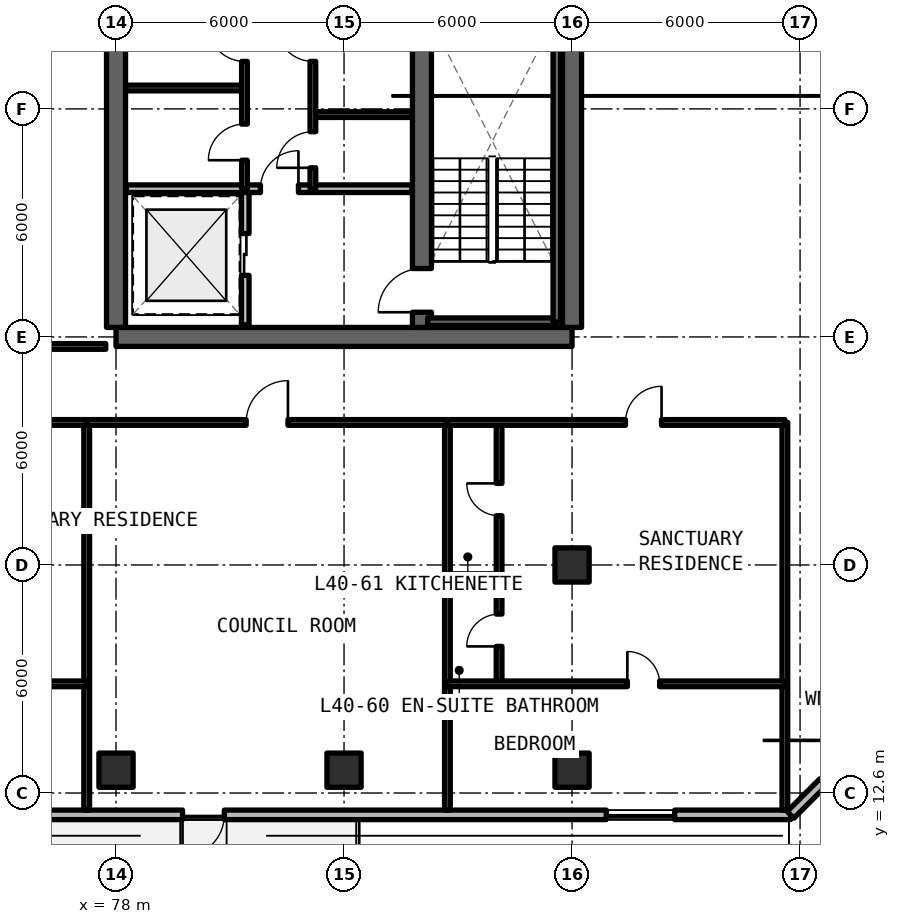
"""IFC4 building model, lengths in metres.
Left out: names, types, materials, properties, quantities, classifications, styles, units other than length and angle.
Written with IfcOpenShell. Run it as: python <this file> out.ifc"""

import sys

from ifc_helpers import new_model, si_unit, direction, frame, frame_2d, origin, origin_2d, place, context, subcontext, project, spatial, rectangle, extrude, element, fill, save


model = new_model("IFC4")
c1 = context("Model", 3, precision=1e-05, world=origin(), true_north=direction((0.0, 1.0)))
c2 = subcontext(c1, "Body", "Model", "MODEL_VIEW")
j1 = project(units=[si_unit("LENGTHUNIT", "METRE"), si_unit("PLANEANGLEUNIT", "RADIAN")], contexts=[c1])
p1 = place(None, origin())
s1 = spatial("IfcSite", under=j1, at=p1, CompositionType="ELEMENT")
p2 = place(p1, origin())
s2 = spatial("IfcBuilding", under=s1, at=p2, CompositionType="ELEMENT")
p3 = place(p2, frame((0.0, 0.0, 145.2)))
s3 = spatial("IfcBuildingStorey", under=s2, at=p3, CompositionType="ELEMENT", Elevation=145.2)
p4 = place(p3, frame((78.0, 24.6, 0.0), z_axis=(0.0, 0.0, 1.0), x_axis=(1.0, 0.0, 0.0)))
e1 = element("IfcWall", 1, at=p4, inside=s3, PredefinedType="SHEAR", context=c2, shape_type="SweptSolid", body=[
    extrude(rectangle(XDim=12.0, YDim=0.5, at=frame_2d((6.0, 0.0))), origin(), (0.0, 0.0, 1.0), 3.3),
])
p5 = place(p3, frame((90.0, 24.85, 0.0), z_axis=(0.0, 0.0, 1.0), x_axis=(0.0, 1.0, 0.0)))
e2 = element("IfcWall", 2, at=p5, inside=s3, PredefinedType="SHEAR", context=c2, shape_type="SweptSolid", body=[
    extrude(rectangle(XDim=17.5, YDim=0.5, at=frame_2d((8.75, 0.0))), origin(), (0.0, 0.0, 1.0), 3.3),
])
p6 = place(p3, frame((78.0, 24.85, 0.0), z_axis=(0.0, 0.0, 1.0), x_axis=(0.0, 1.0, 0.0)))
e3 = element("IfcWall", 3, at=p6, inside=s3, PredefinedType="SHEAR", context=c2, shape_type="SweptSolid", body=[
    extrude(rectangle(XDim=8.95, YDim=0.5, at=frame_2d((4.475, 0.0))), origin(), (0.0, 0.0, 1.0), 3.3),
])
p7 = place(p3, frame((86.05, 24.85, 0.0), z_axis=(0.0, 0.0, 1.0), x_axis=(0.0, 1.0, 0.0)))
e4 = element("IfcWall", 4, at=p7, inside=s3, PredefinedType="SHEAR", context=c2, shape_type="SweptSolid", body=[
    extrude(rectangle(XDim=17.5, YDim=0.5, at=frame_2d((8.75, 0.0))), origin(), (0.0, 0.0, 1.0), 3.3),
])
p8 = place(p7, frame((0.4, 0.0, 0.0)))
e5 = element("IfcOpeningElement", 5, at=p8, cuts=e4, PredefinedType="OPENING", context=c2, shape_type="SweptSolid", body=[
    extrude(rectangle(XDim=1.15, YDim=2.15, at=frame_2d((0.575, 1.075))), frame((0.0, 0.26, 0.0), z_axis=(0.0, -1.0, 0.0), x_axis=(1.0, 0.0, 0.0)), (0.0, 0.0, 1.0), 0.52),
])
p9 = place(p7, frame((9.6, 0.0, 0.0)))
e6 = element("IfcOpeningElement", 6, at=p9, cuts=e4, PredefinedType="OPENING", context=c2, shape_type="SweptSolid", body=[
    extrude(rectangle(XDim=1.15, YDim=2.15, at=frame_2d((0.575, 1.075))), frame((0.0, 0.26, 0.0), z_axis=(0.0, -1.0, 0.0), x_axis=(1.0, 0.0, 0.0)), (0.0, 0.0, 1.0), 0.52),
])
for number, where, z_axis, x_axis in (
    (7, (90.0, 18.6, 0.0), (0.0, 0.0, 1.0), (1.0, 0.0, 0.0)),
    (8, (78.0, 13.2, 0.0), (0.0, 0.0, 1.0), (1.0, 0.0, 0.0)),
    (9, (84.0, 13.2, 0.0), (0.0, 0.0, 1.0), (1.0, 0.0, 0.0)),
    (10, (90.0, 13.2, 0.0), (0.0, 0.0, 1.0), (1.0, 0.0, 0.0)),
):
    element("IfcColumn", number, at=place(p3, frame(where, z_axis=z_axis, x_axis=x_axis)), inside=s3, PredefinedType="COLUMN", context=c2, shape_type="SweptSolid", body=[
        extrude(rectangle(XDim=0.9, YDim=0.9, at=origin_2d()), origin(), (0.0, 0.0, 1.0), 3.3),
    ])
p10 = place(p3, frame((52.125, 12.025, 0.0), z_axis=(0.0, 0.0, 1.0), x_axis=(1.0, 0.0, 0.0)))
e11 = element("IfcWall", 11, at=p10, inside=s3, PredefinedType="SOLIDWALL", context=c2, shape_type="SweptSolid", body=[
    extrude(rectangle(XDim=43.623, YDim=0.25, at=frame_2d((21.812, 0.0))), origin(), (0.0, 0.0, 1.0), 3.08),
])
p11 = place(p10, frame((16.775, 0.0, 0.0)))
e12 = element("IfcOpeningElement", 12, at=p11, cuts=e11, PredefinedType="OPENING", context=c2, shape_type="SweptSolid", body=[
    extrude(rectangle(XDim=1.1, YDim=2.15, at=frame_2d((0.55, 1.075))), frame((0.0, 0.135, 0.0), z_axis=(0.0, -1.0, 0.0), x_axis=(1.0, 0.0, 0.0)), (0.0, 0.0, 1.0), 0.27),
])
p12 = place(p10, frame((27.625, 0.0, 0.0)))
e13 = element("IfcOpeningElement", 13, at=p12, cuts=e11, PredefinedType="OPENING", context=c2, shape_type="SweptSolid", body=[
    extrude(rectangle(XDim=1.1, YDim=2.15, at=frame_2d((0.55, 1.075))), frame((0.0, 0.135, 0.0), z_axis=(0.0, -1.0, 0.0), x_axis=(1.0, 0.0, 0.0)), (0.0, 0.0, 1.0), 0.27),
])
p13 = place(p10, frame((2.769, 0.0, 0.78)))
e14 = element("IfcOpeningElement", 14, at=p13, cuts=e11, PredefinedType="OPENING", context=c2, shape_type="SweptSolid", body=[
    extrude(rectangle(XDim=1.8, YDim=1.66, at=frame_2d((0.9, 0.83))), frame((0.0, 0.135, 0.0), z_axis=(0.0, -1.0, 0.0), x_axis=(1.0, 0.0, 0.0)), (0.0, 0.0, 1.0), 0.27),
])
p14 = place(p10, frame((10.884, 0.0, 0.78)))
e15 = element("IfcOpeningElement", 15, at=p14, cuts=e11, PredefinedType="OPENING", context=c2, shape_type="SweptSolid", body=[
    extrude(rectangle(XDim=1.8, YDim=1.66, at=frame_2d((0.9, 0.83))), frame((0.0, 0.135, 0.0), z_axis=(0.0, -1.0, 0.0), x_axis=(1.0, 0.0, 0.0)), (0.0, 0.0, 1.0), 0.27),
])
p15 = place(p10, frame((38.775, 0.0, 0.78)))
e16 = element("IfcOpeningElement", 16, at=p15, cuts=e11, PredefinedType="OPENING", context=c2, shape_type="SweptSolid", body=[
    extrude(rectangle(XDim=1.8, YDim=1.66, at=frame_2d((0.9, 0.83))), frame((0.0, 0.135, 0.0), z_axis=(0.0, -1.0, 0.0), x_axis=(1.0, 0.0, 0.0)), (0.0, 0.0, 1.0), 0.27),
])
p16 = place(p3, frame((95.748, 12.025, 0.0), z_axis=(0.0, 0.0, 1.0), x_axis=(0.70708586489, 0.707127696864, 0.0)))
e17 = element("IfcWall", 17, at=p16, inside=s3, PredefinedType="SOLIDWALL", context=c2, shape_type="SweptSolid", body=[
    extrude(rectangle(XDim=5.836, YDim=0.25, at=frame_2d((2.918, 0.0))), origin(), (0.0, 0.0, 1.0), 3.08),
])
p17 = place(p16, frame((1.218, 0.0, 0.78)))
e18 = element("IfcOpeningElement", 18, at=p17, cuts=e17, PredefinedType="OPENING", context=c2, shape_type="SweptSolid", body=[
    extrude(rectangle(XDim=3.4, YDim=1.66, at=frame_2d((1.7, 0.83))), frame((0.0, 0.135, 0.0), z_axis=(0.0, -1.0, 0.0), x_axis=(1.0, 0.0, 0.0)), (0.0, 0.0, 1.0), 0.27),
])
p18 = place(p3, frame((81.4, 24.92, 0.0), z_axis=(0.0, 0.0, 1.0), x_axis=(0.0, 1.0, 0.0)))
e19 = element("IfcWall", 19, at=p18, inside=s3, PredefinedType="SOLIDWALL", context=c2, shape_type="SweptSolid", body=[
    extrude(rectangle(XDim=3.58, YDim=0.2, at=frame_2d((1.79, 0.0))), origin(), (0.0, 0.0, 1.0), 2.35),
])
p19 = place(p18, frame((1.3, 0.0, 0.0)))
e20 = element("IfcOpeningElement", 20, at=p19, cuts=e19, PredefinedType="OPENING", context=c2, shape_type="SweptSolid", body=[
    extrude(rectangle(XDim=1.1, YDim=2.2, at=frame_2d((0.55, 1.1))), frame((0.0, 0.11, 0.0), z_axis=(0.0, -1.0, 0.0), x_axis=(1.0, 0.0, 0.0)), (0.0, 0.0, 1.0), 0.22),
])
p20 = place(p3, frame((78.27, 28.5, 0.0), z_axis=(0.0, 0.0, 1.0), x_axis=(1.0, 0.0, 0.0)))
e21 = element("IfcWall", 21, at=p20, inside=s3, PredefinedType="SOLIDWALL", context=c2, shape_type="SweptSolid", body=[
    extrude(rectangle(XDim=7.51, YDim=0.2, at=frame_2d((3.755, 0.0))), origin(), (0.0, 0.0, 1.0), 2.35),
])
p21 = place(p20, frame((3.53, 0.0, 0.0)))
e22 = element("IfcOpeningElement", 22, at=p21, cuts=e21, PredefinedType="OPENING", context=c2, shape_type="SweptSolid", body=[
    extrude(rectangle(XDim=1.0, YDim=2.15, at=frame_2d((0.5, 1.075))), frame((0.0, 0.11, 0.0), z_axis=(0.0, -1.0, 0.0), x_axis=(1.0, 0.0, 0.0)), (0.0, 0.0, 1.0), 0.22),
])
p22 = place(p3, frame((83.2, 30.45, 0.0), z_axis=(0.0, 0.0, 1.0), x_axis=(1.0, 0.0, 0.0)))
e23 = element("IfcWall", 23, at=p22, inside=s3, PredefinedType="SOLIDWALL", context=c2, shape_type="SweptSolid", body=[
    extrude(rectangle(XDim=2.58, YDim=0.15, at=frame_2d((1.29, 0.0))), origin(), (0.0, 0.0, 1.0), 2.35),
])
p23 = place(p3, frame((83.18, 28.5, 0.0), z_axis=(0.0, 0.0, 1.0), x_axis=(0.0, 1.0, 0.0)))
e24 = element("IfcWall", 24, at=p23, inside=s3, PredefinedType="SOLIDWALL", context=c2, shape_type="SweptSolid", body=[
    extrude(rectangle(XDim=5.22, YDim=0.15, at=frame_2d((2.61, 0.0))), origin(), (0.0, 0.0, 1.0), 2.35),
])
p24 = place(p23, frame((0.55, 0.0, 0.0)))
e25 = element("IfcOpeningElement", 25, at=p24, cuts=e24, PredefinedType="OPENING", context=c2, shape_type="SweptSolid", body=[
    extrude(rectangle(XDim=0.95, YDim=2.15, at=frame_2d((0.475, 1.075))), frame((0.0, 0.085, 0.0), z_axis=(0.0, -1.0, 0.0), x_axis=(1.0, 0.0, 0.0)), (0.0, 0.0, 1.0), 0.17),
])
p25 = place(p23, frame((3.35, 0.0, 0.0)))
e26 = element("IfcOpeningElement", 26, at=p25, cuts=e24, PredefinedType="OPENING", context=c2, shape_type="SweptSolid", body=[
    extrude(rectangle(XDim=0.95, YDim=2.15, at=frame_2d((0.475, 1.075))), frame((0.0, 0.085, 0.0), z_axis=(0.0, -1.0, 0.0), x_axis=(1.0, 0.0, 0.0)), (0.0, 0.0, 1.0), 0.17),
])
p26 = place(p3, frame((78.27, 31.15, 0.0), z_axis=(0.0, 0.0, 1.0), x_axis=(1.0, 0.0, 0.0)))
e27 = element("IfcWall", 27, at=p26, inside=s3, PredefinedType="SOLIDWALL", context=c2, shape_type="SweptSolid", body=[
    extrude(rectangle(XDim=3.05, YDim=0.15, at=frame_2d((1.525, 0.0))), origin(), (0.0, 0.0, 1.0), 2.35),
])
p27 = place(p3, frame((81.38, 28.5, 0.0), z_axis=(0.0, 0.0, 1.0), x_axis=(0.0, 1.0, 0.0)))
e28 = element("IfcWall", 28, at=p27, inside=s3, PredefinedType="SOLIDWALL", context=c2, shape_type="SweptSolid", body=[
    extrude(rectangle(XDim=5.22, YDim=0.15, at=frame_2d((2.61, 0.0))), origin(), (0.0, 0.0, 1.0), 2.35),
])
p28 = place(p27, frame((0.75, 0.0, 0.0)))
e29 = element("IfcOpeningElement", 29, at=p28, cuts=e28, PredefinedType="OPENING", context=c2, shape_type="SweptSolid", body=[
    extrude(rectangle(XDim=0.95, YDim=2.15, at=frame_2d((0.475, 1.075))), frame((0.0, 0.085, 0.0), z_axis=(0.0, -1.0, 0.0), x_axis=(1.0, 0.0, 0.0)), (0.0, 0.0, 1.0), 0.17),
])
p29 = place(p27, frame((3.35, 0.0, 0.0)))
e30 = element("IfcOpeningElement", 30, at=p29, cuts=e28, PredefinedType="OPENING", context=c2, shape_type="SweptSolid", body=[
    extrude(rectangle(XDim=0.95, YDim=2.15, at=frame_2d((0.475, 1.075))), frame((0.0, 0.085, 0.0), z_axis=(0.0, -1.0, 0.0), x_axis=(1.0, 0.0, 0.0)), (0.0, 0.0, 1.0), 0.17),
])
p30 = place(p3, frame((69.85, 24.35, 0.0), z_axis=(0.0, 0.0, 1.0), x_axis=(1.0, 0.0, 0.0)))
e31 = element("IfcWall", 31, at=p30, inside=s3, PredefinedType="SOLIDWALL", context=c2, shape_type="SweptSolid", body=[
    extrude(rectangle(XDim=7.88, YDim=0.15, at=frame_2d((3.94, 0.0))), origin(), (0.0, 0.0, 1.0), 2.35),
])
for number, where, z_axis, x_axis in (
    (32, (95.6, 12.15, 0.0), (0.0, 0.0, 1.0), (0.0, 1.0, 0.0)),
    (33, (77.228, 12.15, 0.0), (0.0, 0.0, 1.0), (0.0, 1.0, 0.0)),
):
    element("IfcWall", number, at=place(p3, frame(where, z_axis=z_axis, x_axis=x_axis)), inside=s3, PredefinedType="SOLIDWALL", context=c2, shape_type="SweptSolid", body=[
        extrude(rectangle(XDim=10.2, YDim=0.15, at=frame_2d((5.1, 0.0))), origin(), (0.0, 0.0, 1.0), 2.35),
    ])
p31 = place(p3, frame((68.348, 15.472, 0.0), z_axis=(0.0, 0.0, 1.0), x_axis=(1.0, 0.0, 0.0)))
e34 = element("IfcWall", 34, at=p31, inside=s3, PredefinedType="PARTITIONING", context=c2, shape_type="SweptSolid", body=[
    extrude(rectangle(XDim=8.88, YDim=0.15, at=frame_2d((4.44, 0.0))), origin(), (0.0, 0.0, 1.0), 2.35),
])
p32 = place(p31, frame((4.921, 0.0, 0.0)))
e35 = element("IfcOpeningElement", 35, at=p32, cuts=e34, PredefinedType="OPENING", context=c2, shape_type="SweptSolid", body=[
    extrude(rectangle(XDim=0.85, YDim=2.1, at=frame_2d((0.425, 1.05))), frame((0.0, 0.085, 0.0), z_axis=(0.0, -1.0, 0.0), x_axis=(1.0, 0.0, 0.0)), (0.0, 0.0, 1.0), 0.17),
])
p33 = place(p3, frame((68.348, 22.35, 0.0), z_axis=(0.0, 0.0, 1.0), x_axis=(1.0, 0.0, 0.0)))
e36 = element("IfcWall", 36, at=p33, inside=s3, PredefinedType="SOLIDWALL", context=c2, shape_type="SweptSolid", body=[
    extrude(rectangle(XDim=8.88, YDim=0.15, at=frame_2d((4.44, 0.0))), origin(), (0.0, 0.0, 1.0), 2.35),
])
p34 = place(p33, frame((4.871, 0.0, 0.0)))
e37 = element("IfcOpeningElement", 37, at=p34, cuts=e36, PredefinedType="OPENING", context=c2, shape_type="SweptSolid", body=[
    extrude(rectangle(XDim=0.95, YDim=2.15, at=frame_2d((0.475, 1.075))), frame((0.0, 0.085, 0.0), z_axis=(0.0, -1.0, 0.0), x_axis=(1.0, 0.0, 0.0)), (0.0, 0.0, 1.0), 0.17),
])
p35 = place(p3, frame((86.72, 12.15, 0.0), z_axis=(0.0, 0.0, 1.0), x_axis=(0.0, 1.0, 0.0)))
e38 = element("IfcWall", 38, at=p35, inside=s3, PredefinedType="SOLIDWALL", context=c2, shape_type="SweptSolid", body=[
    extrude(rectangle(XDim=10.2, YDim=0.15, at=frame_2d((5.1, 0.0))), origin(), (0.0, 0.0, 1.0), 2.35),
])
p36 = place(p3, frame((77.228, 22.35, 0.0), z_axis=(0.0, 0.0, 1.0), x_axis=(1.0, 0.0, 0.0)))
e39 = element("IfcWall", 39, at=p36, inside=s3, PredefinedType="SOLIDWALL", context=c2, shape_type="SweptSolid", body=[
    extrude(rectangle(XDim=9.492, YDim=0.15, at=frame_2d((4.746, 0.0))), origin(), (0.0, 0.0, 1.0), 2.35),
])
p37 = place(p36, frame((4.196, 0.0, 0.0)))
e40 = element("IfcOpeningElement", 40, at=p37, cuts=e39, PredefinedType="OPENING", context=c2, shape_type="SweptSolid", body=[
    extrude(rectangle(XDim=1.1, YDim=2.15, at=frame_2d((0.55, 1.075))), frame((0.0, 0.085, 0.0), z_axis=(0.0, -1.0, 0.0), x_axis=(1.0, 0.0, 0.0)), (0.0, 0.0, 1.0), 0.17),
])
p38 = place(p3, frame((86.72, 18.292, 0.0), z_axis=(0.0, 0.0, 1.0), x_axis=(1.0, 0.0, 0.0)))
e41 = element("IfcWall", 41, at=p38, inside=s3, PredefinedType="PARTITIONING", context=c2, shape_type="SweptSolid", body=[
    extrude(rectangle(XDim=1.36, YDim=0.15, at=frame_2d((0.68, 0.0))), origin(), (0.0, 0.0, 1.0), 2.35),
])
p39 = place(p3, frame((88.08, 15.472, 0.0), z_axis=(0.0, 0.0, 1.0), x_axis=(0.0, 1.0, 0.0)))
e42 = element("IfcWall", 42, at=p39, inside=s3, PredefinedType="PARTITIONING", context=c2, shape_type="SweptSolid", body=[
    extrude(rectangle(XDim=6.878, YDim=0.15, at=frame_2d((3.439, 0.0))), origin(), (0.0, 0.0, 1.0), 2.35),
])
p40 = place(p39, frame((0.985, 0.0, 0.0)))
e43 = element("IfcOpeningElement", 43, at=p40, cuts=e42, PredefinedType="OPENING", context=c2, shape_type="SweptSolid", body=[
    extrude(rectangle(XDim=0.85, YDim=2.1, at=frame_2d((0.425, 1.05))), frame((0.0, 0.085, 0.0), z_axis=(0.0, -1.0, 0.0), x_axis=(1.0, 0.0, 0.0)), (0.0, 0.0, 1.0), 0.17),
])
p41 = place(p39, frame((4.424, 0.0, 0.0)))
e44 = element("IfcOpeningElement", 44, at=p41, cuts=e42, PredefinedType="OPENING", context=c2, shape_type="SweptSolid", body=[
    extrude(rectangle(XDim=0.85, YDim=2.1, at=frame_2d((0.425, 1.05))), frame((0.0, 0.085, 0.0), z_axis=(0.0, -1.0, 0.0), x_axis=(1.0, 0.0, 0.0)), (0.0, 0.0, 1.0), 0.17),
])
p42 = place(p3, frame((86.72, 15.472, 0.0), z_axis=(0.0, 0.0, 1.0), x_axis=(1.0, 0.0, 0.0)))
e45 = element("IfcWall", 45, at=p42, inside=s3, PredefinedType="PARTITIONING", context=c2, shape_type="SweptSolid", body=[
    extrude(rectangle(XDim=8.88, YDim=0.15, at=frame_2d((4.44, 0.0))), origin(), (0.0, 0.0, 1.0), 2.35),
])
p43 = place(p42, frame((4.735, 0.0, 0.0)))
e46 = element("IfcOpeningElement", 46, at=p43, cuts=e45, PredefinedType="OPENING", context=c2, shape_type="SweptSolid", body=[
    extrude(rectangle(XDim=0.85, YDim=2.1, at=frame_2d((0.425, 1.05))), frame((0.0, 0.085, 0.0), z_axis=(0.0, -1.0, 0.0), x_axis=(1.0, 0.0, 0.0)), (0.0, 0.0, 1.0), 0.17),
])
p44 = place(p3, frame((86.72, 22.35, 0.0), z_axis=(0.0, 0.0, 1.0), x_axis=(1.0, 0.0, 0.0)))
e47 = element("IfcWall", 47, at=p44, inside=s3, PredefinedType="SOLIDWALL", context=c2, shape_type="SweptSolid", body=[
    extrude(rectangle(XDim=8.88, YDim=0.15, at=frame_2d((4.44, 0.0))), origin(), (0.0, 0.0, 1.0), 2.35),
])
p45 = place(p44, frame((4.685, 0.0, 0.0)))
e48 = element("IfcOpeningElement", 48, at=p45, cuts=e47, PredefinedType="OPENING", context=c2, shape_type="SweptSolid", body=[
    extrude(rectangle(XDim=0.95, YDim=2.15, at=frame_2d((0.475, 1.075))), frame((0.0, 0.085, 0.0), z_axis=(0.0, -1.0, 0.0), x_axis=(1.0, 0.0, 0.0)), (0.0, 0.0, 1.0), 0.17),
])
p46 = place(p3, frame((86.2, 25.0, 0.0), z_axis=(0.0, 0.0, 1.0), x_axis=(1.0, 0.0, 0.0)))
e49 = element("IfcWall", 49, at=p46, inside=s3, PredefinedType="SOLIDWALL", context=c2, shape_type="SweptSolid", body=[
    extrude(rectangle(XDim=3.4, YDim=0.2, at=frame_2d((1.7, 0.0))), origin(), (0.0, 0.0, 1.0), 3.3),
])
p47 = place(p3, frame((89.6, 25.0, 0.0), z_axis=(0.0, 0.0, 1.0), x_axis=(0.0, 1.0, 0.0)))
e50 = element("IfcWall", 50, at=p47, inside=s3, PredefinedType="SOLIDWALL", context=c2, shape_type="SweptSolid", body=[
    extrude(rectangle(XDim=8.0, YDim=0.2, at=frame_2d((4.0, 0.0))), origin(), (0.0, 0.0, 1.0), 3.3),
])
p48 = place(p12, frame((1.1, 0.0, 0.0), z_axis=(0.0, 0.0, 1.0), x_axis=(-1.0, 0.0, 0.0)))
e51 = element("IfcDoor", 51, at=p48, inside=s3, OperationType="SINGLE_SWING_RIGHT", PredefinedType="DOOR", context=c2, shape_type="SweptSolid", body=[
    extrude(rectangle(XDim=1.1, YDim=2.15, at=frame_2d((0.55, 1.075))), frame((0.0, 0.025, 0.0), z_axis=(0.0, -1.0, 0.0), x_axis=(1.0, 0.0, 0.0)), (0.0, 0.0, 1.0), 0.05),
])
fill(e13, e51)
p49 = place(p15, origin())
e52 = element("IfcWindow", 52, at=p49, inside=s3, PartitioningType="SINGLE_PANEL", PredefinedType="WINDOW", context=c2, shape_type="SweptSolid", body=[
    extrude(rectangle(XDim=1.8, YDim=1.66, at=frame_2d((0.9, 0.83))), frame((0.0, 0.03, 0.0), z_axis=(0.0, -1.0, 0.0), x_axis=(1.0, 0.0, 0.0)), (0.0, 0.0, 1.0), 0.06),
])
fill(e16, e52)
p50 = place(p19, origin())
e53 = element("IfcDoor", 53, at=p50, inside=s3, OperationType="SLIDING_TO_LEFT", PredefinedType="DOOR", context=c2, shape_type="SweptSolid", body=[
    extrude(rectangle(XDim=1.1, YDim=2.2, at=frame_2d((0.55, 1.1))), frame((0.0, 0.025, 0.0), z_axis=(0.0, -1.0, 0.0), x_axis=(1.0, 0.0, 0.0)), (0.0, 0.0, 1.0), 0.05),
])
fill(e20, e53)
p51 = place(p21, origin())
e54 = element("IfcDoor", 54, at=p51, inside=s3, OperationType="SINGLE_SWING_RIGHT", PredefinedType="DOOR", context=c2, shape_type="SweptSolid", body=[
    extrude(rectangle(XDim=1.0, YDim=2.15, at=frame_2d((0.5, 1.075))), frame((0.0, 0.025, 0.0), z_axis=(0.0, -1.0, 0.0), x_axis=(1.0, 0.0, 0.0)), (0.0, 0.0, 1.0), 0.05),
])
fill(e22, e54)
p52 = place(p24, origin())
e55 = element("IfcDoor", 55, at=p52, inside=s3, OperationType="SINGLE_SWING_LEFT", PredefinedType="DOOR", context=c2, shape_type="SweptSolid", body=[
    extrude(rectangle(XDim=0.95, YDim=2.15, at=frame_2d((0.475, 1.075))), frame((0.0, 0.025, 0.0), z_axis=(0.0, -1.0, 0.0), x_axis=(1.0, 0.0, 0.0)), (0.0, 0.0, 1.0), 0.05),
])
fill(e25, e55)
p53 = place(p25, origin())
e56 = element("IfcDoor", 56, at=p53, inside=s3, OperationType="SINGLE_SWING_RIGHT", PredefinedType="DOOR", context=c2, shape_type="SweptSolid", body=[
    extrude(rectangle(XDim=0.95, YDim=2.15, at=frame_2d((0.475, 1.075))), frame((0.0, 0.025, 0.0), z_axis=(0.0, -1.0, 0.0), x_axis=(1.0, 0.0, 0.0)), (0.0, 0.0, 1.0), 0.05),
])
fill(e26, e56)
p54 = place(p28, origin())
e57 = element("IfcDoor", 57, at=p54, inside=s3, OperationType="SINGLE_SWING_LEFT", PredefinedType="DOOR", context=c2, shape_type="SweptSolid", body=[
    extrude(rectangle(XDim=0.95, YDim=2.15, at=frame_2d((0.475, 1.075))), frame((0.0, 0.025, 0.0), z_axis=(0.0, -1.0, 0.0), x_axis=(1.0, 0.0, 0.0)), (0.0, 0.0, 1.0), 0.05),
])
fill(e29, e57)
p55 = place(p29, origin())
e58 = element("IfcDoor", 58, at=p55, inside=s3, OperationType="SINGLE_SWING_RIGHT", PredefinedType="DOOR", context=c2, shape_type="SweptSolid", body=[
    extrude(rectangle(XDim=0.95, YDim=2.15, at=frame_2d((0.475, 1.075))), frame((0.0, 0.025, 0.0), z_axis=(0.0, -1.0, 0.0), x_axis=(1.0, 0.0, 0.0)), (0.0, 0.0, 1.0), 0.05),
])
fill(e30, e58)
p56 = place(p37, origin())
e59 = element("IfcDoor", 59, at=p56, inside=s3, OperationType="SINGLE_SWING_RIGHT", PredefinedType="DOOR", context=c2, shape_type="SweptSolid", body=[
    extrude(rectangle(XDim=1.1, YDim=2.15, at=frame_2d((0.55, 1.075))), frame((0.0, 0.025, 0.0), z_axis=(0.0, -1.0, 0.0), x_axis=(1.0, 0.0, 0.0)), (0.0, 0.0, 1.0), 0.05),
])
fill(e40, e59)
p57 = place(p40, origin())
e60 = element("IfcDoor", 60, at=p57, inside=s3, OperationType="SINGLE_SWING_LEFT", PredefinedType="DOOR", context=c2, shape_type="SweptSolid", body=[
    extrude(rectangle(XDim=0.85, YDim=2.1, at=frame_2d((0.425, 1.05))), frame((0.0, 0.025, 0.0), z_axis=(0.0, -1.0, 0.0), x_axis=(1.0, 0.0, 0.0)), (0.0, 0.0, 1.0), 0.05),
])
fill(e43, e60)
p58 = place(p41, origin())
e61 = element("IfcDoor", 61, at=p58, inside=s3, OperationType="SINGLE_SWING_RIGHT", PredefinedType="DOOR", context=c2, shape_type="SweptSolid", body=[
    extrude(rectangle(XDim=0.85, YDim=2.1, at=frame_2d((0.425, 1.05))), frame((0.0, 0.025, 0.0), z_axis=(0.0, -1.0, 0.0), x_axis=(1.0, 0.0, 0.0)), (0.0, 0.0, 1.0), 0.05),
])
fill(e44, e61)
p59 = place(p43, origin())
e62 = element("IfcDoor", 62, at=p59, inside=s3, OperationType="SINGLE_SWING_LEFT", PredefinedType="DOOR", context=c2, shape_type="SweptSolid", body=[
    extrude(rectangle(XDim=0.85, YDim=2.1, at=frame_2d((0.425, 1.05))), frame((0.0, 0.025, 0.0), z_axis=(0.0, -1.0, 0.0), x_axis=(1.0, 0.0, 0.0)), (0.0, 0.0, 1.0), 0.05),
])
fill(e46, e62)
p60 = place(p45, origin())
e63 = element("IfcDoor", 63, at=p60, inside=s3, OperationType="SINGLE_SWING_RIGHT", PredefinedType="DOOR", context=c2, shape_type="SweptSolid", body=[
    extrude(rectangle(XDim=0.95, YDim=2.15, at=frame_2d((0.475, 1.075))), frame((0.0, 0.025, 0.0), z_axis=(0.0, -1.0, 0.0), x_axis=(1.0, 0.0, 0.0)), (0.0, 0.0, 1.0), 0.05),
])
fill(e48, e63)
p61 = place(p8, origin())
e64 = element("IfcDoor", 64, at=p61, inside=s3, OperationType="SINGLE_SWING_RIGHT", PredefinedType="DOOR", context=c2, shape_type="SweptSolid", body=[
    extrude(rectangle(XDim=1.15, YDim=2.15, at=frame_2d((0.575, 1.075))), frame((0.0, 0.025, 0.0), z_axis=(0.0, -1.0, 0.0), x_axis=(1.0, 0.0, 0.0)), (0.0, 0.0, 1.0), 0.05),
])
fill(e5, e64)
save(model, sys.argv[1])
